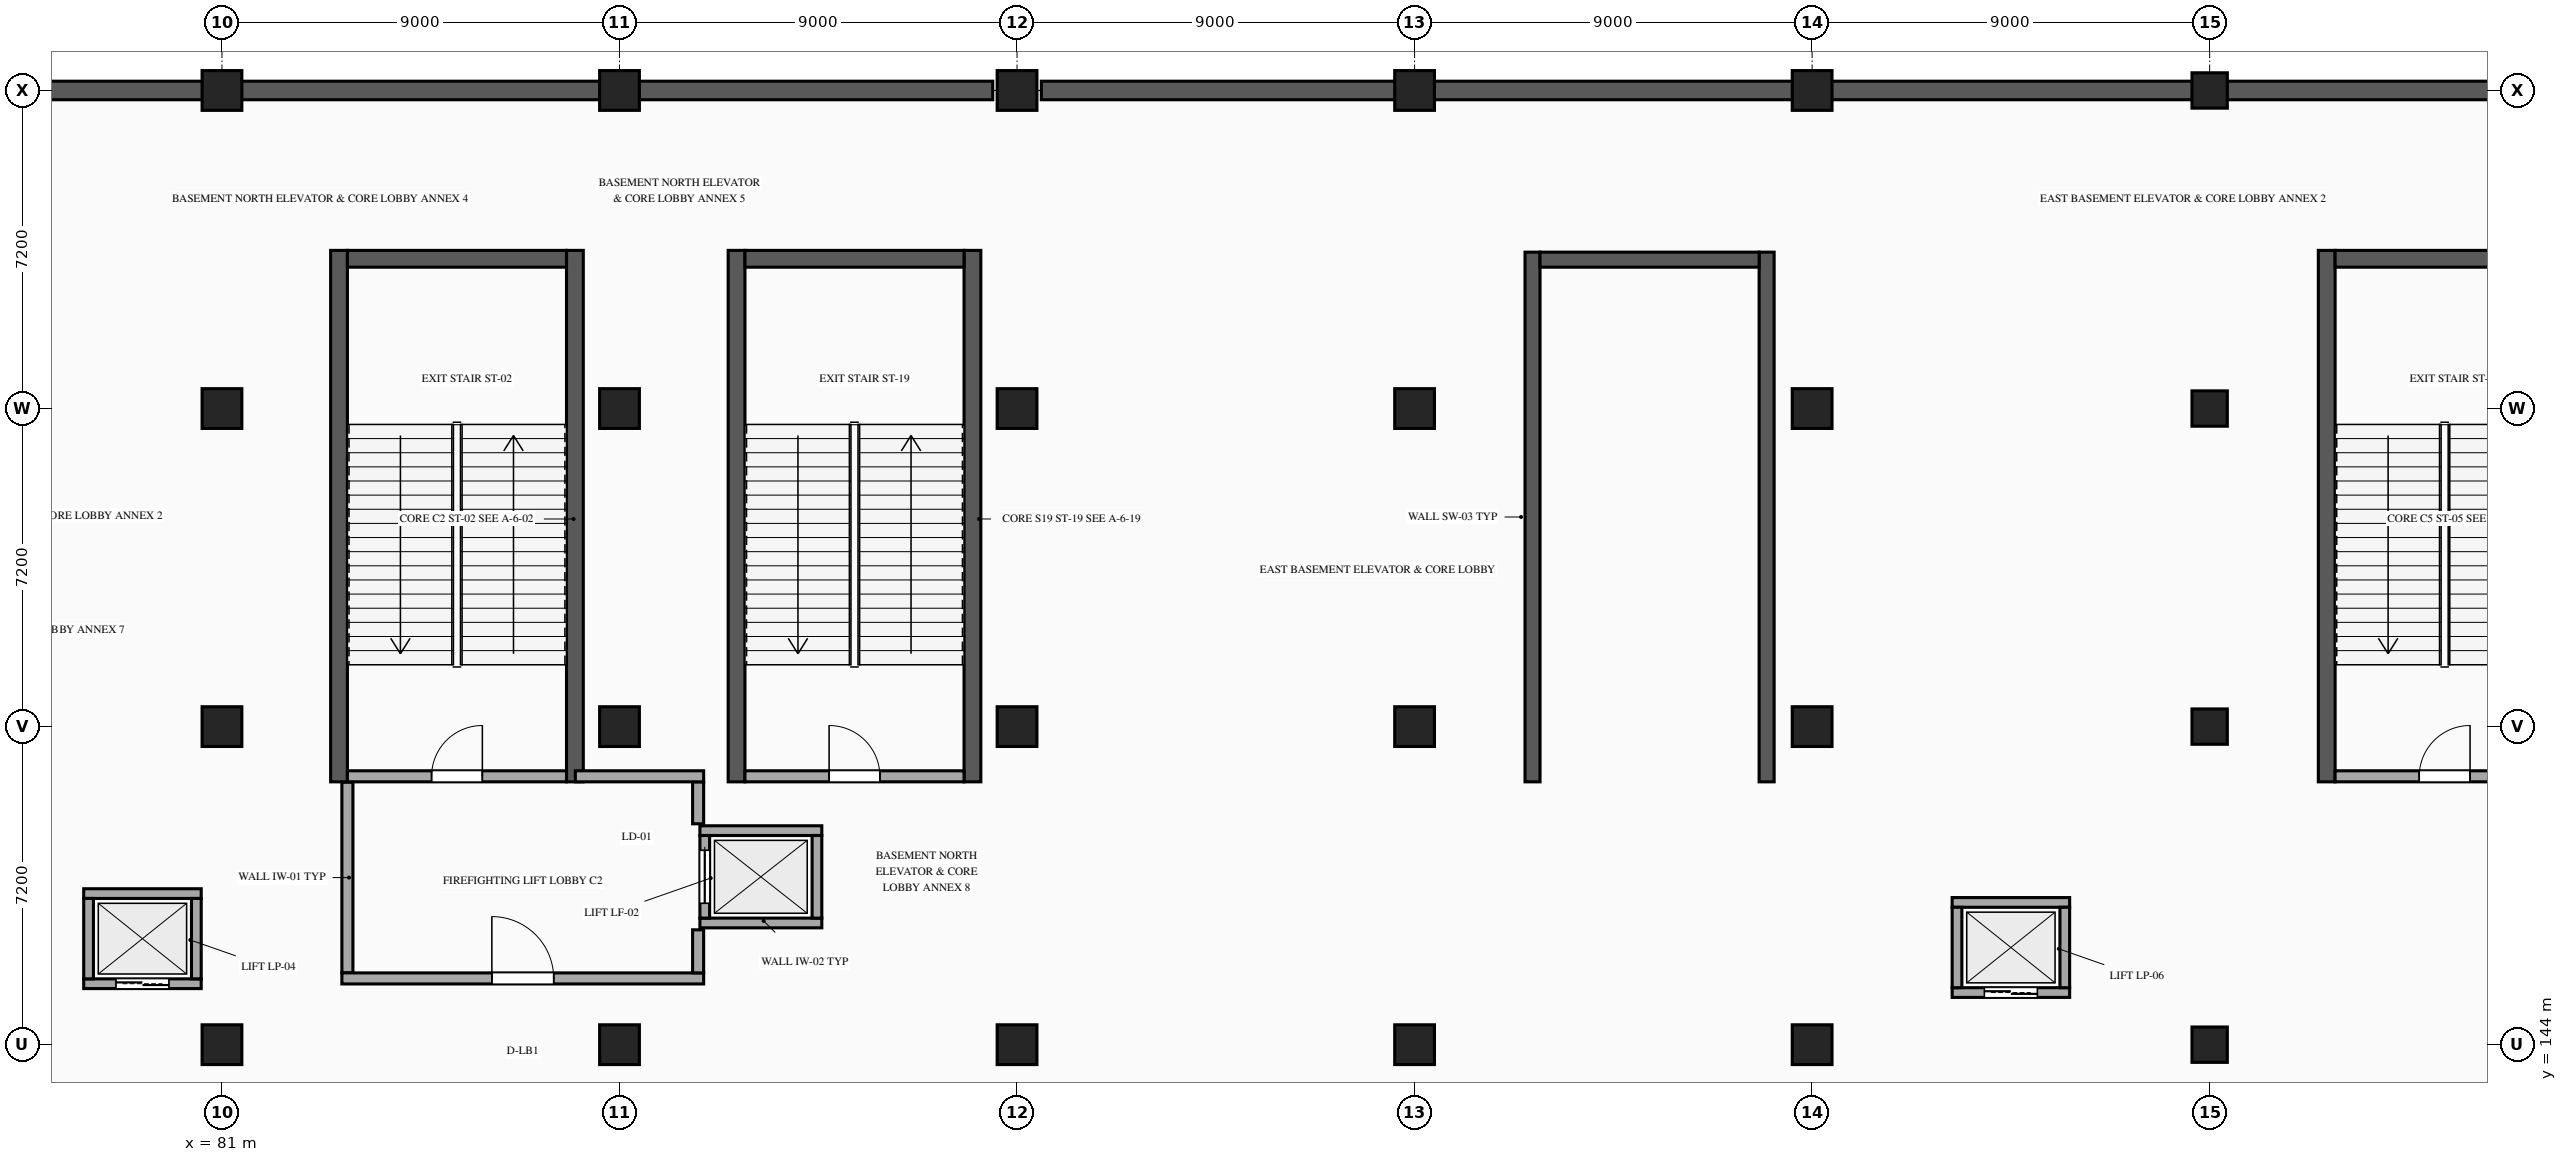
"""IFC4 building model, lengths in metres.
Left out: names, types, materials, properties, quantities, classifications, styles, units other than length and angle.
Written with IfcOpenShell. Run it as: python <this file> out.ifc"""

import sys

from ifc_helpers import new_model, si_unit, direction, frame, frame_2d, origin, origin_2d, place, context, subcontext, project, spatial, rectangle, extrude, element, fill, save


model = new_model("IFC4")
c1 = context("Model", 3, precision=1e-05, world=origin(), true_north=direction((0.0, 1.0)))
c2 = subcontext(c1, "Body", "Model", "MODEL_VIEW")
j1 = project(units=[si_unit("LENGTHUNIT", "METRE"), si_unit("PLANEANGLEUNIT", "RADIAN")], contexts=[c1])
p1 = place(None, origin())
s1 = spatial("IfcSite", under=j1, at=p1, CompositionType="ELEMENT")
p2 = place(p1, origin())
s2 = spatial("IfcBuilding", under=s1, at=p2, CompositionType="ELEMENT")
p3 = place(p2, frame((0.0, 0.0, -5.4)))
s3 = spatial("IfcBuildingStorey", under=s2, at=p3, CompositionType="ELEMENT", Elevation=-5.4)
for number, where, z_axis, x_axis in (
    (1, (81.0, 144.0, 0.0), (0.0, 0.0, 1.0), (1.0, 0.0, 0.0)),
    (2, (81.0, 151.2, 0.0), (0.0, 0.0, 1.0), (1.0, 0.0, 0.0)),
    (3, (81.0, 158.4, 0.0), (0.0, 0.0, 1.0), (1.0, 0.0, 0.0)),
    (4, (81.0, 165.6, 0.0), (0.0, 0.0, 1.0), (1.0, 0.0, 0.0)),
    (5, (90.0, 144.0, 0.0), (0.0, 0.0, 1.0), (1.0, 0.0, 0.0)),
    (6, (90.0, 151.2, 0.0), (0.0, 0.0, 1.0), (1.0, 0.0, 0.0)),
    (7, (90.0, 158.4, 0.0), (0.0, 0.0, 1.0), (1.0, 0.0, 0.0)),
    (8, (90.0, 165.6, 0.0), (0.0, 0.0, 1.0), (1.0, 0.0, 0.0)),
    (9, (99.0, 144.0, 0.0), (0.0, 0.0, 1.0), (1.0, 0.0, 0.0)),
    (10, (99.0, 151.2, 0.0), (0.0, 0.0, 1.0), (1.0, 0.0, 0.0)),
    (11, (99.0, 158.4, 0.0), (0.0, 0.0, 1.0), (1.0, 0.0, 0.0)),
    (12, (99.0, 165.6, 0.0), (0.0, 0.0, 1.0), (1.0, 0.0, 0.0)),
    (13, (108.0, 144.0, 0.0), (0.0, 0.0, 1.0), (1.0, 0.0, 0.0)),
    (14, (108.0, 151.2, 0.0), (0.0, 0.0, 1.0), (1.0, 0.0, 0.0)),
    (15, (108.0, 158.4, 0.0), (0.0, 0.0, 1.0), (1.0, 0.0, 0.0)),
    (16, (108.0, 165.6, 0.0), (0.0, 0.0, 1.0), (1.0, 0.0, 0.0)),
    (17, (117.0, 144.0, 0.0), (0.0, 0.0, 1.0), (1.0, 0.0, 0.0)),
    (18, (117.0, 151.2, 0.0), (0.0, 0.0, 1.0), (1.0, 0.0, 0.0)),
    (19, (117.0, 158.4, 0.0), (0.0, 0.0, 1.0), (1.0, 0.0, 0.0)),
    (20, (117.0, 165.6, 0.0), (0.0, 0.0, 1.0), (1.0, 0.0, 0.0)),
):
    element("IfcColumn", number, at=place(p3, frame(where, z_axis=z_axis, x_axis=x_axis)), inside=s3, PredefinedType="COLUMN", context=c2, shape_type="SweptSolid", body=[
        extrude(rectangle(XDim=0.9, YDim=0.9, at=origin_2d()), origin(), (0.0, 0.0, 1.0), 5.4),
    ])
for number, where, z_axis, x_axis in (
    (21, (126.0, 144.0, 0.0), (0.0, 0.0, 1.0), (1.0, 0.0, 0.0)),
    (22, (126.0, 151.2, 0.0), (0.0, 0.0, 1.0), (1.0, 0.0, 0.0)),
    (23, (126.0, 158.4, 0.0), (0.0, 0.0, 1.0), (1.0, 0.0, 0.0)),
    (24, (126.0, 165.6, 0.0), (0.0, 0.0, 1.0), (1.0, 0.0, 0.0)),
):
    element("IfcColumn", number, at=place(p3, frame(where, z_axis=z_axis, x_axis=x_axis)), inside=s3, PredefinedType="COLUMN", context=c2, shape_type="SweptSolid", body=[
        extrude(rectangle(XDim=0.8, YDim=0.8, at=origin_2d()), origin(), (0.0, 0.0, 1.0), 5.4),
    ])
p4 = place(p3, frame((36.55, 165.6, 0.0), z_axis=(0.0, 0.0, 1.0), x_axis=(1.0, 0.0, 0.0)))
e25 = element("IfcWall", 25, at=p4, inside=s3, PredefinedType="USERDEFINED", context=c2, shape_type="SweptSolid", body=[
    extrude(rectangle(XDim=61.9, YDim=0.42, at=frame_2d((30.95, 0.0))), origin(), (0.0, 0.0, 1.0), 4.08),
])
p5 = place(p3, frame((99.55, 165.6, 0.0), z_axis=(0.0, 0.0, 1.0), x_axis=(1.0, 0.0, 0.0)))
e26 = element("IfcWall", 26, at=p5, inside=s3, PredefinedType="USERDEFINED", context=c2, shape_type="SweptSolid", body=[
    extrude(rectangle(XDim=52.9, YDim=0.42, at=frame_2d((26.45, 0.0))), origin(), (0.0, 0.0, 1.0), 4.08),
])
for number, where, z_axis, x_axis in (
    (27, (83.65, 149.95, 0.0), (0.0, 0.0, 1.0), (0.0, 1.0, 0.0)),
    (28, (88.99, 161.98, 0.0), (0.0, 0.0, 1.0), (0.0, -1.0, 0.0)),
):
    element("IfcWall", number, at=place(p3, frame(where, z_axis=z_axis, x_axis=x_axis)), inside=s3, PredefinedType="SHEAR", context=c2, shape_type="SweptSolid", body=[
        extrude(rectangle(XDim=12.03, YDim=0.38, at=frame_2d((6.015, 0.0))), origin(), (0.0, 0.0, 1.0), 5.08),
    ])
p6 = place(p3, frame((83.84, 161.79, 0.0), z_axis=(0.0, 0.0, 1.0), x_axis=(1.0, 0.0, 0.0)))
e29 = element("IfcWall", 29, at=p6, inside=s3, PredefinedType="SHEAR", context=c2, shape_type="SweptSolid", body=[
    extrude(rectangle(XDim=4.96, YDim=0.38, at=frame_2d((2.48, 0.0))), origin(), (0.0, 0.0, 1.0), 5.08),
])
p7 = place(p3, frame((128.65, 149.95, 0.0), z_axis=(0.0, 0.0, 1.0), x_axis=(0.0, 1.0, 0.0)))
e30 = element("IfcWall", 30, at=p7, inside=s3, PredefinedType="SHEAR", context=c2, shape_type="SweptSolid", body=[
    extrude(rectangle(XDim=12.03, YDim=0.38, at=frame_2d((6.015, 0.0))), origin(), (0.0, 0.0, 1.0), 5.08),
])
p8 = place(p3, frame((128.84, 161.79, 0.0), z_axis=(0.0, 0.0, 1.0), x_axis=(1.0, 0.0, 0.0)))
e31 = element("IfcWall", 31, at=p8, inside=s3, PredefinedType="SHEAR", context=c2, shape_type="SweptSolid", body=[
    extrude(rectangle(XDim=4.96, YDim=0.38, at=frame_2d((2.48, 0.0))), origin(), (0.0, 0.0, 1.0), 5.08),
])
for number, where, z_axis, x_axis in (
    (32, (110.67, 149.95, 0.0), (0.0, 0.0, 1.0), (0.0, 1.0, 0.0)),
    (33, (115.97, 161.94, 0.0), (0.0, 0.0, 1.0), (0.0, -1.0, 0.0)),
):
    element("IfcWall", number, at=place(p3, frame(where, z_axis=z_axis, x_axis=x_axis)), inside=s3, PredefinedType="SHEAR", context=c2, shape_type="SweptSolid", body=[
        extrude(rectangle(XDim=11.99, YDim=0.34, at=frame_2d((5.995, 0.0))), origin(), (0.0, 0.0, 1.0), 5.08),
    ])
p9 = place(p3, frame((110.84, 161.77, 0.0), z_axis=(0.0, 0.0, 1.0), x_axis=(1.0, 0.0, 0.0)))
e34 = element("IfcWall", 34, at=p9, inside=s3, PredefinedType="SHEAR", context=c2, shape_type="SweptSolid", body=[
    extrude(rectangle(XDim=4.96, YDim=0.34, at=frame_2d((2.48, 0.0))), origin(), (0.0, 0.0, 1.0), 5.08),
])
for number, where, z_axis, x_axis in (
    (35, (92.65, 149.95, 0.0), (0.0, 0.0, 1.0), (0.0, 1.0, 0.0)),
    (36, (97.99, 161.98, 0.0), (0.0, 0.0, 1.0), (0.0, -1.0, 0.0)),
):
    element("IfcWall", number, at=place(p3, frame(where, z_axis=z_axis, x_axis=x_axis)), inside=s3, PredefinedType="SHEAR", context=c2, shape_type="SweptSolid", body=[
        extrude(rectangle(XDim=12.03, YDim=0.38, at=frame_2d((6.015, 0.0))), origin(), (0.0, 0.0, 1.0), 5.08),
    ])
p10 = place(p3, frame((92.84, 161.79, 0.0), z_axis=(0.0, 0.0, 1.0), x_axis=(1.0, 0.0, 0.0)))
e37 = element("IfcWall", 37, at=p10, inside=s3, PredefinedType="SHEAR", context=c2, shape_type="SweptSolid", body=[
    extrude(rectangle(XDim=4.96, YDim=0.38, at=frame_2d((2.48, 0.0))), origin(), (0.0, 0.0, 1.0), 5.08),
])
p11 = place(p3, frame((83.84, 150.075, 0.0), z_axis=(0.0, 0.0, 1.0), x_axis=(1.0, 0.0, 0.0)))
e38 = element("IfcWall", 38, at=p11, inside=s3, PredefinedType="STANDARD", context=c2, shape_type="SweptSolid", body=[
    extrude(rectangle(XDim=4.96, YDim=0.25, at=frame_2d((2.48, 0.0))), origin(), (0.0, 0.0, 1.0), 4.95),
])
p12 = place(p11, frame((1.905, 0.0, 0.0)))
e39 = element("IfcOpeningElement", 39, at=p12, cuts=e38, PredefinedType="OPENING", context=c2, shape_type="SweptSolid", body=[
    extrude(rectangle(XDim=1.15, YDim=2.2, at=frame_2d((0.575, 1.1))), frame((0.0, 0.135, 0.0), z_axis=(0.0, -1.0, 0.0), x_axis=(1.0, 0.0, 0.0)), (0.0, 0.0, 1.0), 0.27),
])
for number, where, z_axis, x_axis in (
    (40, (91.82, 146.755, 0.0), (0.0, 0.0, 1.0), (1.0, 0.0, 0.0)),
    (41, (94.58, 148.845, 0.0), (0.0, 0.0, 1.0), (-1.0, 0.0, 0.0)),
):
    element("IfcWall", number, at=place(p3, frame(where, z_axis=z_axis, x_axis=x_axis)), inside=s3, PredefinedType="STANDARD", context=c2, shape_type="SweptSolid", body=[
        extrude(rectangle(XDim=2.76, YDim=0.22, at=frame_2d((1.38, 0.0))), origin(), (0.0, 0.0, 1.0), 4.95),
    ])
p13 = place(p3, frame((91.93, 148.735, 0.0), z_axis=(0.0, 0.0, 1.0), x_axis=(0.0, -1.0, 0.0)))
e42 = element("IfcWall", 42, at=p13, inside=s3, PredefinedType="STANDARD", context=c2, shape_type="SweptSolid", body=[
    extrude(rectangle(XDim=1.87, YDim=0.22, at=frame_2d((0.935, 0.0))), origin(), (0.0, 0.0, 1.0), 4.95),
])
p14 = place(p13, frame((0.335, 0.0, 0.0)))
e43 = element("IfcOpeningElement", 43, at=p14, cuts=e42, PredefinedType="OPENING", context=c2, shape_type="SweptSolid", body=[
    extrude(rectangle(XDim=1.2, YDim=2.2, at=frame_2d((0.6, 1.1))), frame((0.0, 0.12, 0.0), z_axis=(0.0, -1.0, 0.0), x_axis=(1.0, 0.0, 0.0)), (0.0, 0.0, 1.0), 0.24),
])
p15 = place(p3, frame((94.47, 146.865, 0.0), z_axis=(0.0, 0.0, 1.0), x_axis=(0.0, 1.0, 0.0)))
e44 = element("IfcWall", 44, at=p15, inside=s3, PredefinedType="STANDARD", context=c2, shape_type="SweptSolid", body=[
    extrude(rectangle(XDim=1.87, YDim=0.22, at=frame_2d((0.935, 0.0))), origin(), (0.0, 0.0, 1.0), 4.95),
])
p16 = place(p3, frame((77.87, 145.38, 0.0), z_axis=(0.0, 0.0, 1.0), x_axis=(1.0, 0.0, 0.0)))
e45 = element("IfcWall", 45, at=p16, inside=s3, PredefinedType="STANDARD", context=c2, shape_type="SweptSolid", body=[
    extrude(rectangle(XDim=2.66, YDim=0.22, at=frame_2d((1.33, 0.0))), origin(), (0.0, 0.0, 1.0), 4.95),
])
p17 = place(p16, frame((0.73, 0.0, 0.0)))
e46 = element("IfcOpeningElement", 46, at=p17, cuts=e45, PredefinedType="OPENING", context=c2, shape_type="SweptSolid", body=[
    extrude(rectangle(XDim=1.2, YDim=2.2, at=frame_2d((0.6, 1.1))), frame((0.0, 0.12, 0.0), z_axis=(0.0, -1.0, 0.0), x_axis=(1.0, 0.0, 0.0)), (0.0, 0.0, 1.0), 0.24),
])
p18 = place(p3, frame((80.53, 147.42, 0.0), z_axis=(0.0, 0.0, 1.0), x_axis=(-1.0, 0.0, 0.0)))
e47 = element("IfcWall", 47, at=p18, inside=s3, PredefinedType="STANDARD", context=c2, shape_type="SweptSolid", body=[
    extrude(rectangle(XDim=2.66, YDim=0.22, at=frame_2d((1.33, 0.0))), origin(), (0.0, 0.0, 1.0), 4.95),
])
for number, where, z_axis, x_axis in (
    (48, (77.98, 147.31, 0.0), (0.0, 0.0, 1.0), (0.0, -1.0, 0.0)),
    (49, (80.42, 145.49, 0.0), (0.0, 0.0, 1.0), (0.0, 1.0, 0.0)),
):
    element("IfcWall", number, at=place(p3, frame(where, z_axis=z_axis, x_axis=x_axis)), inside=s3, PredefinedType="STANDARD", context=c2, shape_type="SweptSolid", body=[
        extrude(rectangle(XDim=1.82, YDim=0.22, at=frame_2d((0.91, 0.0))), origin(), (0.0, 0.0, 1.0), 4.95),
    ])
p19 = place(p3, frame((128.84, 150.075, 0.0), z_axis=(0.0, 0.0, 1.0), x_axis=(1.0, 0.0, 0.0)))
e50 = element("IfcWall", 50, at=p19, inside=s3, PredefinedType="STANDARD", context=c2, shape_type="SweptSolid", body=[
    extrude(rectangle(XDim=4.96, YDim=0.25, at=frame_2d((2.48, 0.0))), origin(), (0.0, 0.0, 1.0), 4.95),
])
p20 = place(p19, frame((1.905, 0.0, 0.0)))
e51 = element("IfcOpeningElement", 51, at=p20, cuts=e50, PredefinedType="OPENING", context=c2, shape_type="SweptSolid", body=[
    extrude(rectangle(XDim=1.15, YDim=2.2, at=frame_2d((0.575, 1.1))), frame((0.0, 0.135, 0.0), z_axis=(0.0, -1.0, 0.0), x_axis=(1.0, 0.0, 0.0)), (0.0, 0.0, 1.0), 0.27),
])
p21 = place(p3, frame((120.17, 145.18, 0.0), z_axis=(0.0, 0.0, 1.0), x_axis=(1.0, 0.0, 0.0)))
e52 = element("IfcWall", 52, at=p21, inside=s3, PredefinedType="STANDARD", context=c2, shape_type="SweptSolid", body=[
    extrude(rectangle(XDim=2.66, YDim=0.22, at=frame_2d((1.33, 0.0))), origin(), (0.0, 0.0, 1.0), 4.95),
])
p22 = place(p21, frame((0.73, 0.0, 0.0)))
e53 = element("IfcOpeningElement", 53, at=p22, cuts=e52, PredefinedType="OPENING", context=c2, shape_type="SweptSolid", body=[
    extrude(rectangle(XDim=1.2, YDim=2.2, at=frame_2d((0.6, 1.1))), frame((0.0, 0.12, 0.0), z_axis=(0.0, -1.0, 0.0), x_axis=(1.0, 0.0, 0.0)), (0.0, 0.0, 1.0), 0.24),
])
p23 = place(p3, frame((122.83, 147.22, 0.0), z_axis=(0.0, 0.0, 1.0), x_axis=(-1.0, 0.0, 0.0)))
e54 = element("IfcWall", 54, at=p23, inside=s3, PredefinedType="STANDARD", context=c2, shape_type="SweptSolid", body=[
    extrude(rectangle(XDim=2.66, YDim=0.22, at=frame_2d((1.33, 0.0))), origin(), (0.0, 0.0, 1.0), 4.95),
])
for number, where, z_axis, x_axis in (
    (55, (120.28, 147.11, 0.0), (0.0, 0.0, 1.0), (0.0, -1.0, 0.0)),
    (56, (122.72, 145.29, 0.0), (0.0, 0.0, 1.0), (0.0, 1.0, 0.0)),
):
    element("IfcWall", number, at=place(p3, frame(where, z_axis=z_axis, x_axis=x_axis)), inside=s3, PredefinedType="STANDARD", context=c2, shape_type="SweptSolid", body=[
        extrude(rectangle(XDim=1.82, YDim=0.22, at=frame_2d((0.91, 0.0))), origin(), (0.0, 0.0, 1.0), 4.95),
    ])
p24 = place(p3, frame((92.84, 150.075, 0.0), z_axis=(0.0, 0.0, 1.0), x_axis=(1.0, 0.0, 0.0)))
e57 = element("IfcWall", 57, at=p24, inside=s3, PredefinedType="STANDARD", context=c2, shape_type="SweptSolid", body=[
    extrude(rectangle(XDim=4.96, YDim=0.25, at=frame_2d((2.48, 0.0))), origin(), (0.0, 0.0, 1.0), 4.95),
])
p25 = place(p24, frame((1.905, 0.0, 0.0)))
e58 = element("IfcOpeningElement", 58, at=p25, cuts=e57, PredefinedType="OPENING", context=c2, shape_type="SweptSolid", body=[
    extrude(rectangle(XDim=1.15, YDim=2.2, at=frame_2d((0.575, 1.1))), frame((0.0, 0.135, 0.0), z_axis=(0.0, -1.0, 0.0), x_axis=(1.0, 0.0, 0.0)), (0.0, 0.0, 1.0), 0.27),
])
p26 = place(p3, frame((83.84, 149.94, 0.0), z_axis=(0.0, 0.0, 1.0), x_axis=(0.0, -1.0, 0.0)))
e59 = element("IfcWall", 59, at=p26, inside=s3, PredefinedType="STANDARD", context=c2, shape_type="SweptSolid", body=[
    extrude(rectangle(XDim=4.315, YDim=0.25, at=frame_2d((2.157, 0.0))), origin(), (0.0, 0.0, 1.0), 4.397),
])
p27 = place(p3, frame((83.715, 145.5, 0.0), z_axis=(0.0, 0.0, 1.0), x_axis=(1.0, 0.0, 0.0)))
e60 = element("IfcWall", 60, at=p27, inside=s3, PredefinedType="STANDARD", context=c2, shape_type="SweptSolid", body=[
    extrude(rectangle(XDim=8.19, YDim=0.25, at=frame_2d((4.095, 0.0))), origin(), (0.0, 0.0, 1.0), 4.397),
])
p28 = place(p27, frame((3.395, 0.0, 0.0)))
e61 = element("IfcOpeningElement", 61, at=p28, cuts=e60, PredefinedType="OPENING", context=c2, shape_type="SweptSolid", body=[
    extrude(rectangle(XDim=1.4, YDim=2.2, at=frame_2d((0.7, 1.1))), frame((0.0, 0.135, 0.0), z_axis=(0.0, -1.0, 0.0), x_axis=(1.0, 0.0, 0.0)), (0.0, 0.0, 1.0), 0.27),
])
p29 = place(p3, frame((91.78, 145.625, 0.0), z_axis=(0.0, 0.0, 1.0), x_axis=(0.0, 1.0, 0.0)))
e62 = element("IfcWall", 62, at=p29, inside=s3, PredefinedType="STANDARD", context=c2, shape_type="SweptSolid", body=[
    extrude(rectangle(XDim=0.975, YDim=0.25, at=frame_2d((0.488, 0.0))), origin(), (0.0, 0.0, 1.0), 4.397),
])
p30 = place(p3, frame((91.78, 149.0, 0.0), z_axis=(0.0, 0.0, 1.0), x_axis=(0.0, 1.0, 0.0)))
e63 = element("IfcWall", 63, at=p30, inside=s3, PredefinedType="STANDARD", context=c2, shape_type="SweptSolid", body=[
    extrude(rectangle(XDim=0.95, YDim=0.25, at=frame_2d((0.475, 0.0))), origin(), (0.0, 0.0, 1.0), 4.397),
])
p31 = place(p3, frame((89.0, 150.075, 0.0), z_axis=(0.0, 0.0, 1.0), x_axis=(1.0, 0.0, 0.0)))
e64 = element("IfcWall", 64, at=p31, inside=s3, PredefinedType="STANDARD", context=c2, shape_type="SweptSolid", body=[
    extrude(rectangle(XDim=2.905, YDim=0.25, at=frame_2d((1.453, 0.0))), origin(), (0.0, 0.0, 1.0), 4.397),
])
p32 = place(p12, origin())
e65 = element("IfcDoor", 65, at=p32, inside=s3, OperationType="SINGLE_SWING_RIGHT", PredefinedType="DOOR", context=c2, shape_type="SweptSolid", body=[
    extrude(rectangle(XDim=1.15, YDim=2.2, at=frame_2d((0.575, 1.1))), frame((0.0, 0.025, 0.0), z_axis=(0.0, -1.0, 0.0), x_axis=(1.0, 0.0, 0.0)), (0.0, 0.0, 1.0), 0.05),
])
fill(e39, e65)
p33 = place(p14, origin())
e66 = element("IfcDoor", 66, at=p33, inside=s3, OperationType="DOUBLE_DOOR_SLIDING", PredefinedType="DOOR", context=c2, shape_type="SweptSolid", body=[
    extrude(rectangle(XDim=1.2, YDim=2.2, at=frame_2d((0.6, 1.1))), frame((0.0, 0.025, 0.0), z_axis=(0.0, -1.0, 0.0), x_axis=(1.0, 0.0, 0.0)), (0.0, 0.0, 1.0), 0.05),
])
fill(e43, e66)
p34 = place(p17, origin())
e67 = element("IfcDoor", 67, at=p34, inside=s3, OperationType="DOUBLE_DOOR_SLIDING", PredefinedType="DOOR", context=c2, shape_type="SweptSolid", body=[
    extrude(rectangle(XDim=1.2, YDim=2.2, at=frame_2d((0.6, 1.1))), frame((0.0, 0.025, 0.0), z_axis=(0.0, -1.0, 0.0), x_axis=(1.0, 0.0, 0.0)), (0.0, 0.0, 1.0), 0.05),
])
fill(e46, e67)
p35 = place(p20, origin())
e68 = element("IfcDoor", 68, at=p35, inside=s3, OperationType="SINGLE_SWING_RIGHT", PredefinedType="DOOR", context=c2, shape_type="SweptSolid", body=[
    extrude(rectangle(XDim=1.15, YDim=2.2, at=frame_2d((0.575, 1.1))), frame((0.0, 0.025, 0.0), z_axis=(0.0, -1.0, 0.0), x_axis=(1.0, 0.0, 0.0)), (0.0, 0.0, 1.0), 0.05),
])
fill(e51, e68)
p36 = place(p22, origin())
e69 = element("IfcDoor", 69, at=p36, inside=s3, OperationType="DOUBLE_DOOR_SLIDING", PredefinedType="DOOR", context=c2, shape_type="SweptSolid", body=[
    extrude(rectangle(XDim=1.2, YDim=2.2, at=frame_2d((0.6, 1.1))), frame((0.0, 0.025, 0.0), z_axis=(0.0, -1.0, 0.0), x_axis=(1.0, 0.0, 0.0)), (0.0, 0.0, 1.0), 0.05),
])
fill(e53, e69)
p37 = place(p25, origin())
e70 = element("IfcDoor", 70, at=p37, inside=s3, OperationType="SINGLE_SWING_LEFT", PredefinedType="DOOR", context=c2, shape_type="SweptSolid", body=[
    extrude(rectangle(XDim=1.15, YDim=2.2, at=frame_2d((0.575, 1.1))), frame((0.0, 0.025, 0.0), z_axis=(0.0, -1.0, 0.0), x_axis=(1.0, 0.0, 0.0)), (0.0, 0.0, 1.0), 0.05),
])
fill(e58, e70)
p38 = place(p28, origin())
e71 = element("IfcDoor", 71, at=p38, inside=s3, OperationType="SINGLE_SWING_LEFT", PredefinedType="DOOR", context=c2, shape_type="SweptSolid", body=[
    extrude(rectangle(XDim=1.4, YDim=2.2, at=frame_2d((0.7, 1.1))), frame((0.0, 0.025, 0.0), z_axis=(0.0, -1.0, 0.0), x_axis=(1.0, 0.0, 0.0)), (0.0, 0.0, 1.0), 0.05),
])
fill(e61, e71)
save(model, sys.argv[1])
